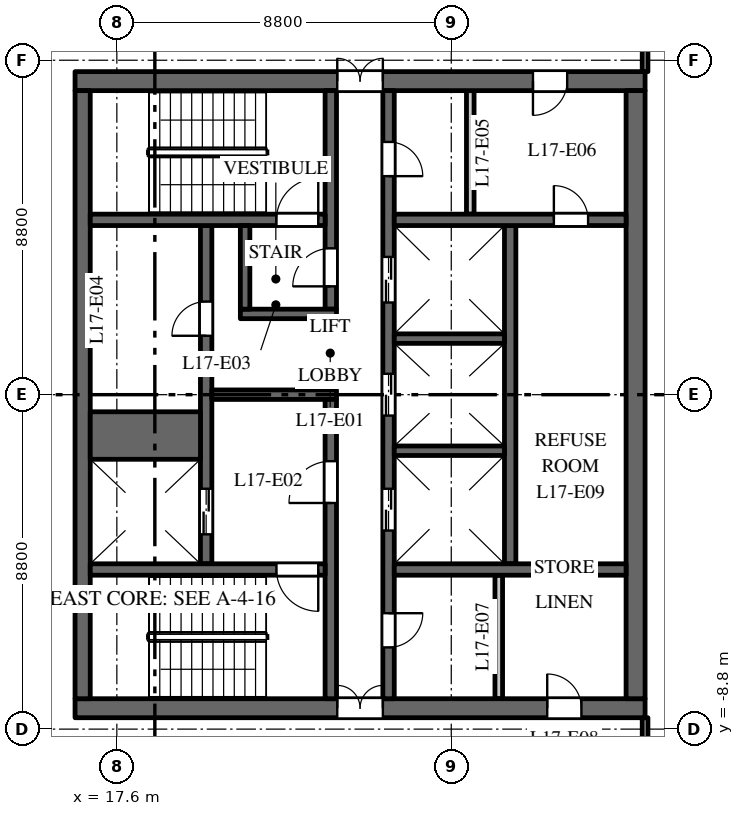
"""IFC4 building model, lengths in metres.
Left out: names, types, materials, properties, quantities, classifications, styles, units other than length and angle.
Written with IfcOpenShell. Run it as: python <this file> out.ifc"""

import sys

from ifc_helpers import new_model, si_unit, direction, frame, frame_2d, origin, place, context, subcontext, project, spatial, rectangle, extrude, element, fill, save


model = new_model("IFC4")
c1 = context("Model", 3, precision=1e-05, world=origin(), true_north=direction((0.0, 1.0)))
c2 = subcontext(c1, "Body", "Model", "MODEL_VIEW")
j1 = project(units=[si_unit("LENGTHUNIT", "METRE"), si_unit("PLANEANGLEUNIT", "RADIAN")], contexts=[c1])
p1 = place(None, origin())
s1 = spatial("IfcSite", under=j1, at=p1, CompositionType="ELEMENT")
p2 = place(p1, origin())
s2 = spatial("IfcBuilding", under=s1, at=p2, CompositionType="ELEMENT")
p3 = place(p2, frame((0.0, 0.0, 78.5)))
s3 = spatial("IfcBuildingStorey", under=s2, at=p3, CompositionType="ELEMENT", Elevation=78.5)
p4 = place(p3, frame((16.5, 8.25, 0.0), z_axis=(0.0, 0.0, 1.0), x_axis=(1.0, 0.0, 0.0)))
e1 = element("IfcWall", 1, at=p4, inside=s3, PredefinedType="SHEAR", context=c2, shape_type="SweptSolid", body=[
    extrude(rectangle(XDim=15.0, YDim=0.5, at=frame_2d((7.5, 0.0))), origin(), (0.0, 0.0, 1.0), 3.7),
])
p5 = place(p4, frame((6.9, 0.0, 0.0)))
e2 = element("IfcOpeningElement", 2, at=p5, cuts=e1, PredefinedType="OPENING", context=c2, shape_type="SweptSolid", body=[
    extrude(rectangle(XDim=1.2, YDim=2.1, at=frame_2d((0.6, 1.05))), frame((0.0, 0.26, 0.0), z_axis=(0.0, -1.0, 0.0), x_axis=(1.0, 0.0, 0.0)), (0.0, 0.0, 1.0), 0.52),
])
p6 = place(p4, frame((12.05, 0.0, 0.0)))
e3 = element("IfcOpeningElement", 3, at=p6, cuts=e1, PredefinedType="OPENING", context=c2, shape_type="SweptSolid", body=[
    extrude(rectangle(XDim=0.9, YDim=2.1, at=frame_2d((0.45, 1.05))), frame((0.0, 0.26, 0.0), z_axis=(0.0, -1.0, 0.0), x_axis=(1.0, 0.0, 0.0)), (0.0, 0.0, 1.0), 0.52),
])
p7 = place(p3, frame((16.5, -8.25, 0.0), z_axis=(0.0, 0.0, 1.0), x_axis=(1.0, 0.0, 0.0)))
e4 = element("IfcWall", 4, at=p7, inside=s3, PredefinedType="SHEAR", context=c2, shape_type="SweptSolid", body=[
    extrude(rectangle(XDim=15.0, YDim=0.5, at=frame_2d((7.5, 0.0))), origin(), (0.0, 0.0, 1.0), 3.7),
])
p8 = place(p7, frame((6.9, 0.0, 0.0)))
e5 = element("IfcOpeningElement", 5, at=p8, cuts=e4, PredefinedType="OPENING", context=c2, shape_type="SweptSolid", body=[
    extrude(rectangle(XDim=1.2, YDim=2.1, at=frame_2d((0.6, 1.05))), frame((0.0, 0.26, 0.0), z_axis=(0.0, -1.0, 0.0), x_axis=(1.0, 0.0, 0.0)), (0.0, 0.0, 1.0), 0.52),
])
p9 = place(p7, frame((12.425, 0.0, 0.0)))
e6 = element("IfcOpeningElement", 6, at=p9, cuts=e4, PredefinedType="OPENING", context=c2, shape_type="SweptSolid", body=[
    extrude(rectangle(XDim=0.9, YDim=2.1, at=frame_2d((0.45, 1.05))), frame((0.0, 0.26, 0.0), z_axis=(0.0, -1.0, 0.0), x_axis=(1.0, 0.0, 0.0)), (0.0, 0.0, 1.0), 0.52),
])
p10 = place(p3, frame((27.95, -4.45, 0.0), z_axis=(0.0, 0.0, 1.0), x_axis=(0.0, 1.0, 0.0)))
e7 = element("IfcWall", 7, at=p10, inside=s3, PredefinedType="SHEAR", context=c2, shape_type="SweptSolid", body=[
    extrude(rectangle(XDim=8.9, YDim=0.3, at=frame_2d((4.45, 0.0))), origin(), (0.0, 0.0, 1.0), 3.7),
])
p11 = place(p3, frame((19.95, -4.45, 0.0), z_axis=(0.0, 0.0, 1.0), x_axis=(0.0, 1.0, 0.0)))
e8 = element("IfcWall", 8, at=p11, inside=s3, PredefinedType="SHEAR", context=c2, shape_type="SweptSolid", body=[
    extrude(rectangle(XDim=8.9, YDim=0.3, at=frame_2d((4.45, 0.0))), origin(), (0.0, 0.0, 1.0), 3.7),
])
p12 = place(p11, frame((0.775, 0.0, 0.0)))
e9 = element("IfcOpeningElement", 9, at=p12, cuts=e8, PredefinedType="OPENING", context=c2, shape_type="SweptSolid", body=[
    extrude(rectangle(XDim=1.2, YDim=2.1, at=frame_2d((0.6, 1.05))), frame((0.0, 0.16, 0.0), z_axis=(0.0, -1.0, 0.0), x_axis=(1.0, 0.0, 0.0)), (0.0, 0.0, 1.0), 0.32),
])
p13 = place(p11, frame((6.0, 0.0, 0.0)))
e10 = element("IfcOpeningElement", 10, at=p13, cuts=e8, PredefinedType="OPENING", context=c2, shape_type="SweptSolid", body=[
    extrude(rectangle(XDim=0.9, YDim=2.1, at=frame_2d((0.45, 1.05))), frame((0.0, 0.16, 0.0), z_axis=(0.0, -1.0, 0.0), x_axis=(1.0, 0.0, 0.0)), (0.0, 0.0, 1.0), 0.32),
])
p14 = place(p3, frame((24.75, -8.0, 0.0), z_axis=(0.0, 0.0, 1.0), x_axis=(0.0, 1.0, 0.0)))
e11 = element("IfcWall", 11, at=p14, inside=s3, PredefinedType="SHEAR", context=c2, shape_type="SweptSolid", body=[
    extrude(rectangle(XDim=16.0, YDim=0.3, at=frame_2d((8.0, 0.0))), origin(), (0.0, 0.0, 1.0), 3.7),
])
p15 = place(p14, frame((4.425, 0.0, 0.0)))
e12 = element("IfcOpeningElement", 12, at=p15, cuts=e11, PredefinedType="OPENING", context=c2, shape_type="SweptSolid", body=[
    extrude(rectangle(XDim=1.1, YDim=2.1, at=frame_2d((0.55, 1.05))), frame((0.0, 0.16, 0.0), z_axis=(0.0, -1.0, 0.0), x_axis=(1.0, 0.0, 0.0)), (0.0, 0.0, 1.0), 0.32),
])
p16 = place(p14, frame((7.45, 0.0, 0.0)))
e13 = element("IfcOpeningElement", 13, at=p16, cuts=e11, PredefinedType="OPENING", context=c2, shape_type="SweptSolid", body=[
    extrude(rectangle(XDim=1.1, YDim=2.1, at=frame_2d((0.55, 1.05))), frame((0.0, 0.16, 0.0), z_axis=(0.0, -1.0, 0.0), x_axis=(1.0, 0.0, 0.0)), (0.0, 0.0, 1.0), 0.32),
])
p17 = place(p14, frame((10.425, 0.0, 0.0)))
e14 = element("IfcOpeningElement", 14, at=p17, cuts=e11, PredefinedType="OPENING", context=c2, shape_type="SweptSolid", body=[
    extrude(rectangle(XDim=1.2, YDim=2.1, at=frame_2d((0.6, 1.05))), frame((0.0, 0.16, 0.0), z_axis=(0.0, -1.0, 0.0), x_axis=(1.0, 0.0, 0.0)), (0.0, 0.0, 1.0), 0.32),
])
p18 = place(p14, frame((13.75, 0.0, 0.0)))
e15 = element("IfcOpeningElement", 15, at=p18, cuts=e11, PredefinedType="OPENING", context=c2, shape_type="SweptSolid", body=[
    extrude(rectangle(XDim=0.9, YDim=2.1, at=frame_2d((0.45, 1.05))), frame((0.0, 0.16, 0.0), z_axis=(0.0, -1.0, 0.0), x_axis=(1.0, 0.0, 0.0)), (0.0, 0.0, 1.0), 0.32),
])
p19 = place(p14, frame((1.35, 0.0, 0.0)))
e16 = element("IfcOpeningElement", 16, at=p19, cuts=e11, PredefinedType="OPENING", context=c2, shape_type="SweptSolid", body=[
    extrude(rectangle(XDim=0.9, YDim=2.1, at=frame_2d((0.45, 1.05))), frame((0.0, 0.16, 0.0), z_axis=(0.0, -1.0, 0.0), x_axis=(1.0, 0.0, 0.0)), (0.0, 0.0, 1.0), 0.32),
])
p20 = place(p3, frame((20.1, 0.0, 0.0), z_axis=(0.0, 0.0, 1.0), x_axis=(1.0, 0.0, 0.0)))
e17 = element("IfcWall", 17, at=p20, inside=s3, PredefinedType="SHEAR", context=c2, shape_type="SweptSolid", body=[
    extrude(rectangle(XDim=3.28, YDim=0.25, at=frame_2d((1.64, 0.0))), origin(), (0.0, 0.0, 1.0), 3.7),
])
p21 = place(p3, frame((16.7, -8.0, 0.0), z_axis=(0.0, 0.0, 1.0), x_axis=(0.0, 1.0, 0.0)))
e18 = element("IfcWall", 18, at=p21, inside=s3, PredefinedType="SHEAR", context=c2, shape_type="SweptSolid", body=[
    extrude(rectangle(XDim=16.0, YDim=0.4, at=frame_2d((8.0, 0.0))), origin(), (0.0, 0.0, 1.0), 3.7),
])
p22 = place(p3, frame((31.25, -8.0, 0.0), z_axis=(0.0, 0.0, 1.0), x_axis=(0.0, 1.0, 0.0)))
e19 = element("IfcWall", 19, at=p22, inside=s3, PredefinedType="SHEAR", context=c2, shape_type="SweptSolid", body=[
    extrude(rectangle(XDim=16.0, YDim=0.5, at=frame_2d((8.0, 0.0))), origin(), (0.0, 0.0, 1.0), 3.7),
])
p23 = place(p3, frame((24.9, 4.6, 0.0), z_axis=(0.0, 0.0, 1.0), x_axis=(1.0, 0.0, 0.0)))
e20 = element("IfcWall", 20, at=p23, inside=s3, PredefinedType="SHEAR", context=c2, shape_type="SweptSolid", body=[
    extrude(rectangle(XDim=6.1, YDim=0.3, at=frame_2d((3.05, 0.0))), origin(), (0.0, 0.0, 1.0), 3.7),
])
p24 = place(p23, frame((4.2, 0.0, 0.0)))
e21 = element("IfcOpeningElement", 21, at=p24, cuts=e20, PredefinedType="OPENING", context=c2, shape_type="SweptSolid", body=[
    extrude(rectangle(XDim=0.9, YDim=2.1, at=frame_2d((0.45, 1.05))), frame((0.0, 0.16, 0.0), z_axis=(0.0, -1.0, 0.0), x_axis=(1.0, 0.0, 0.0)), (0.0, 0.0, 1.0), 0.32),
])
for number, where, z_axis, x_axis in (
    (22, (26.9, 4.75, 0.0), (0.0, 0.0, 1.0), (0.0, 1.0, 0.0)),
    (23, (27.65, -8.0, 0.0), (0.0, 0.0, 1.0), (0.0, 1.0, 0.0)),
):
    element("IfcWall", number, at=place(p3, frame(where, z_axis=z_axis, x_axis=x_axis)), inside=s3, PredefinedType="PARTITIONING", context=c2, shape_type="SweptSolid", body=[
        extrude(rectangle(XDim=3.25, YDim=0.2, at=frame_2d((1.625, 0.0))), origin(), (0.0, 0.0, 1.0), 3.7),
    ])
p25 = place(p3, frame((24.9, -4.6, 0.0), z_axis=(0.0, 0.0, 1.0), x_axis=(1.0, 0.0, 0.0)))
e24 = element("IfcWall", 24, at=p25, inside=s3, PredefinedType="SHEAR", context=c2, shape_type="SweptSolid", body=[
    extrude(rectangle(XDim=6.1, YDim=0.3, at=frame_2d((3.05, 0.0))), origin(), (0.0, 0.0, 1.0), 3.7),
])
p26 = place(p3, frame((16.9, -1.075, 0.0), z_axis=(0.0, 0.0, 1.0), x_axis=(1.0, 0.0, 0.0)))
e25 = element("IfcWall", 25, at=p26, inside=s3, PredefinedType="SHEAR", context=c2, shape_type="SweptSolid", body=[
    extrude(rectangle(XDim=2.9, YDim=1.25, at=frame_2d((1.45, 0.0))), origin(), (0.0, 0.0, 1.0), 3.7),
])
for number, where, z_axis, x_axis in (
    (26, (24.9, -1.475, 0.0), (0.0, 0.0, 1.0), (1.0, 0.0, 0.0)),
    (27, (24.9, 1.475, 0.0), (0.0, 0.0, 1.0), (1.0, 0.0, 0.0)),
):
    element("IfcWall", number, at=place(p3, frame(where, z_axis=z_axis, x_axis=x_axis)), inside=s3, PredefinedType="SHEAR", context=c2, shape_type="SweptSolid", body=[
        extrude(rectangle(XDim=2.9, YDim=0.25, at=frame_2d((1.45, 0.0))), origin(), (0.0, 0.0, 1.0), 3.7),
    ])
p27 = place(p3, frame((23.23, 2.25, 0.0), z_axis=(0.0, 0.0, 1.0), x_axis=(0.0, 1.0, 0.0)))
e28 = element("IfcWall", 28, at=p27, inside=s3, PredefinedType="SHEAR", context=c2, shape_type="SweptSolid", body=[
    extrude(rectangle(XDim=5.75, YDim=0.3, at=frame_2d((2.875, 0.0))), origin(), (0.0, 0.0, 1.0), 3.7),
])
p28 = place(p27, frame((0.6, 0.0, 0.0)))
e29 = element("IfcOpeningElement", 29, at=p28, cuts=e28, PredefinedType="OPENING", context=c2, shape_type="SweptSolid", body=[
    extrude(rectangle(XDim=1.0, YDim=2.1, at=frame_2d((0.5, 1.05))), frame((0.0, 0.16, 0.0), z_axis=(0.0, -1.0, 0.0), x_axis=(1.0, 0.0, 0.0)), (0.0, 0.0, 1.0), 0.32),
])
p29 = place(p3, frame((23.23, -8.0, 0.0), z_axis=(0.0, 0.0, 1.0), x_axis=(0.0, 1.0, 0.0)))
e30 = element("IfcWall", 30, at=p29, inside=s3, PredefinedType="SHEAR", context=c2, shape_type="SweptSolid", body=[
    extrude(rectangle(XDim=7.875, YDim=0.3, at=frame_2d((3.938, 0.0))), origin(), (0.0, 0.0, 1.0), 3.7),
])
p30 = place(p29, frame((5.15, 0.0, 0.0)))
e31 = element("IfcOpeningElement", 31, at=p30, cuts=e30, PredefinedType="OPENING", context=c2, shape_type="SweptSolid", body=[
    extrude(rectangle(XDim=1.1, YDim=2.1, at=frame_2d((0.55, 1.05))), frame((0.0, 0.16, 0.0), z_axis=(0.0, -1.0, 0.0), x_axis=(1.0, 0.0, 0.0)), (0.0, 0.0, 1.0), 0.32),
])
p31 = place(p3, frame((16.9, 4.6, 0.0), z_axis=(0.0, 0.0, 1.0), x_axis=(1.0, 0.0, 0.0)))
e32 = element("IfcWall", 32, at=p31, inside=s3, PredefinedType="SHEAR", context=c2, shape_type="SweptSolid", body=[
    extrude(rectangle(XDim=6.18, YDim=0.3, at=frame_2d((3.09, 0.0))), origin(), (0.0, 0.0, 1.0), 3.7),
])
p32 = place(p31, frame((4.9, 0.0, 0.0)))
e33 = element("IfcOpeningElement", 33, at=p32, cuts=e32, PredefinedType="OPENING", context=c2, shape_type="SweptSolid", body=[
    extrude(rectangle(XDim=1.1, YDim=2.1, at=frame_2d((0.55, 1.05))), frame((0.0, 0.16, 0.0), z_axis=(0.0, -1.0, 0.0), x_axis=(1.0, 0.0, 0.0)), (0.0, 0.0, 1.0), 0.32),
])
p33 = place(p3, frame((16.9, -4.6, 0.0), z_axis=(0.0, 0.0, 1.0), x_axis=(1.0, 0.0, 0.0)))
e34 = element("IfcWall", 34, at=p33, inside=s3, PredefinedType="SHEAR", context=c2, shape_type="SweptSolid", body=[
    extrude(rectangle(XDim=6.18, YDim=0.3, at=frame_2d((3.09, 0.0))), origin(), (0.0, 0.0, 1.0), 3.7),
])
p34 = place(p33, frame((4.9, 0.0, 0.0)))
e35 = element("IfcOpeningElement", 35, at=p34, cuts=e34, PredefinedType="OPENING", context=c2, shape_type="SweptSolid", body=[
    extrude(rectangle(XDim=1.1, YDim=2.1, at=frame_2d((0.55, 1.05))), frame((0.0, 0.16, 0.0), z_axis=(0.0, -1.0, 0.0), x_axis=(1.0, 0.0, 0.0)), (0.0, 0.0, 1.0), 0.32),
])
p35 = place(p3, frame((20.85, 2.125, 0.0), z_axis=(0.0, 0.0, 1.0), x_axis=(1.0, 0.0, 0.0)))
e36 = element("IfcWall", 36, at=p35, inside=s3, PredefinedType="SHEAR", context=c2, shape_type="SweptSolid", body=[
    extrude(rectangle(XDim=2.53, YDim=0.25, at=frame_2d((1.265, 0.0))), origin(), (0.0, 0.0, 1.0), 3.7),
])
p36 = place(p3, frame((20.975, 2.25, 0.0), z_axis=(0.0, 0.0, 1.0), x_axis=(0.0, 1.0, 0.0)))
e37 = element("IfcWall", 37, at=p36, inside=s3, PredefinedType="SHEAR", context=c2, shape_type="SweptSolid", body=[
    extrude(rectangle(XDim=2.2, YDim=0.25, at=frame_2d((1.1, 0.0))), origin(), (0.0, 0.0, 1.0), 3.7),
])
p37 = place(p3, frame((31.5, -10.7, 0.0), z_axis=(0.0, 0.0, 1.0), x_axis=(0.0, 1.0, 0.0)))
e38 = element("IfcWall", 38, at=p37, inside=s3, PredefinedType="PARTITIONING", context=c2, shape_type="SweptSolid", body=[
    extrude(rectangle(XDim=2.2, YDim=0.15, at=frame_2d((1.1, 0.0))), origin(), (0.0, 0.0, 1.0), 2.85),
])
p38 = place(p37, frame((0.65, 0.0, 0.0)))
e39 = element("IfcOpeningElement", 39, at=p38, cuts=e38, PredefinedType="OPENING", context=c2, shape_type="SweptSolid", body=[
    extrude(rectangle(XDim=1.0, YDim=2.1, at=frame_2d((0.5, 1.05))), frame((0.0, 0.085, 0.0), z_axis=(0.0, -1.0, 0.0), x_axis=(1.0, 0.0, 0.0)), (0.0, 0.0, 1.0), 0.17),
])
p39 = place(p3, frame((31.5, 8.5, 0.0), z_axis=(0.0, 0.0, 1.0), x_axis=(0.0, 1.0, 0.0)))
e40 = element("IfcWall", 40, at=p39, inside=s3, PredefinedType="PARTITIONING", context=c2, shape_type="SweptSolid", body=[
    extrude(rectangle(XDim=2.2, YDim=0.15, at=frame_2d((1.1, 0.0))), origin(), (0.0, 0.0, 1.0), 2.85),
])
p40 = place(p12, origin())
e41 = element("IfcDoor", 41, at=p40, inside=s3, OperationType="DOUBLE_DOOR_SLIDING", PredefinedType="DOOR", context=c2, shape_type="SweptSolid", body=[
    extrude(rectangle(XDim=1.2, YDim=2.1, at=frame_2d((0.6, 1.05))), frame((0.0, 0.025, 0.0), z_axis=(0.0, -1.0, 0.0), x_axis=(1.0, 0.0, 0.0)), (0.0, 0.0, 1.0), 0.05),
])
fill(e9, e41)
p41 = place(p15, origin())
e42 = element("IfcDoor", 42, at=p41, inside=s3, OperationType="DOUBLE_DOOR_SLIDING", PredefinedType="DOOR", context=c2, shape_type="SweptSolid", body=[
    extrude(rectangle(XDim=1.1, YDim=2.1, at=frame_2d((0.55, 1.05))), frame((0.0, 0.025, 0.0), z_axis=(0.0, -1.0, 0.0), x_axis=(1.0, 0.0, 0.0)), (0.0, 0.0, 1.0), 0.05),
])
fill(e12, e42)
p42 = place(p16, origin())
e43 = element("IfcDoor", 43, at=p42, inside=s3, OperationType="DOUBLE_DOOR_SLIDING", PredefinedType="DOOR", context=c2, shape_type="SweptSolid", body=[
    extrude(rectangle(XDim=1.1, YDim=2.1, at=frame_2d((0.55, 1.05))), frame((0.0, 0.025, 0.0), z_axis=(0.0, -1.0, 0.0), x_axis=(1.0, 0.0, 0.0)), (0.0, 0.0, 1.0), 0.05),
])
fill(e13, e43)
p43 = place(p17, origin())
e44 = element("IfcDoor", 44, at=p43, inside=s3, OperationType="DOUBLE_DOOR_SLIDING", PredefinedType="DOOR", context=c2, shape_type="SweptSolid", body=[
    extrude(rectangle(XDim=1.2, YDim=2.1, at=frame_2d((0.6, 1.05))), frame((0.0, 0.025, 0.0), z_axis=(0.0, -1.0, 0.0), x_axis=(1.0, 0.0, 0.0)), (0.0, 0.0, 1.0), 0.05),
])
fill(e14, e44)
p44 = place(p32, origin())
e45 = element("IfcDoor", 45, at=p44, inside=s3, OperationType="SINGLE_SWING_LEFT", PredefinedType="DOOR", context=c2, shape_type="SweptSolid", body=[
    extrude(rectangle(XDim=1.1, YDim=2.1, at=frame_2d((0.55, 1.05))), frame((0.0, 0.025, 0.0), z_axis=(0.0, -1.0, 0.0), x_axis=(1.0, 0.0, 0.0)), (0.0, 0.0, 1.0), 0.05),
])
fill(e33, e45)
p45 = place(p34, origin())
e46 = element("IfcDoor", 46, at=p45, inside=s3, OperationType="SINGLE_SWING_RIGHT", PredefinedType="DOOR", context=c2, shape_type="SweptSolid", body=[
    extrude(rectangle(XDim=1.1, YDim=2.1, at=frame_2d((0.55, 1.05))), frame((0.0, 0.025, 0.0), z_axis=(0.0, -1.0, 0.0), x_axis=(1.0, 0.0, 0.0)), (0.0, 0.0, 1.0), 0.05),
])
fill(e35, e46)
p46 = place(p30, origin())
e47 = element("IfcDoor", 47, at=p46, inside=s3, OperationType="SINGLE_SWING_RIGHT", PredefinedType="DOOR", context=c2, shape_type="SweptSolid", body=[
    extrude(rectangle(XDim=1.1, YDim=2.1, at=frame_2d((0.55, 1.05))), frame((0.0, 0.025, 0.0), z_axis=(0.0, -1.0, 0.0), x_axis=(1.0, 0.0, 0.0)), (0.0, 0.0, 1.0), 0.05),
])
fill(e31, e47)
p47 = place(p28, origin())
e48 = element("IfcDoor", 48, at=p47, inside=s3, OperationType="SINGLE_SWING_RIGHT", PredefinedType="DOOR", context=c2, shape_type="SweptSolid", body=[
    extrude(rectangle(XDim=1.0, YDim=2.1, at=frame_2d((0.5, 1.05))), frame((0.0, 0.025, 0.0), z_axis=(0.0, -1.0, 0.0), x_axis=(1.0, 0.0, 0.0)), (0.0, 0.0, 1.0), 0.05),
])
fill(e29, e48)
p48 = place(p5, origin())
e49 = element("IfcDoor", 49, at=p48, inside=s3, OperationType="DOUBLE_DOOR_DOUBLE_SWING", PredefinedType="DOOR", context=c2, shape_type="SweptSolid", body=[
    extrude(rectangle(XDim=1.2, YDim=2.1, at=frame_2d((0.6, 1.05))), frame((0.0, 0.025, 0.0), z_axis=(0.0, -1.0, 0.0), x_axis=(1.0, 0.0, 0.0)), (0.0, 0.0, 1.0), 0.05),
])
fill(e2, e49)
p49 = place(p8, origin())
e50 = element("IfcDoor", 50, at=p49, inside=s3, OperationType="DOUBLE_DOOR_DOUBLE_SWING", PredefinedType="DOOR", context=c2, shape_type="SweptSolid", body=[
    extrude(rectangle(XDim=1.2, YDim=2.1, at=frame_2d((0.6, 1.05))), frame((0.0, 0.025, 0.0), z_axis=(0.0, -1.0, 0.0), x_axis=(1.0, 0.0, 0.0)), (0.0, 0.0, 1.0), 0.05),
])
fill(e5, e50)
p50 = place(p13, origin())
e51 = element("IfcDoor", 51, at=p50, inside=s3, OperationType="SINGLE_SWING_RIGHT", PredefinedType="DOOR", context=c2, shape_type="SweptSolid", body=[
    extrude(rectangle(XDim=0.9, YDim=2.1, at=frame_2d((0.45, 1.05))), frame((0.0, 0.025, 0.0), z_axis=(0.0, -1.0, 0.0), x_axis=(1.0, 0.0, 0.0)), (0.0, 0.0, 1.0), 0.05),
])
fill(e10, e51)
p51 = place(p18, origin())
e52 = element("IfcDoor", 52, at=p51, inside=s3, OperationType="SINGLE_SWING_LEFT", PredefinedType="DOOR", context=c2, shape_type="SweptSolid", body=[
    extrude(rectangle(XDim=0.9, YDim=2.1, at=frame_2d((0.45, 1.05))), frame((0.0, 0.025, 0.0), z_axis=(0.0, -1.0, 0.0), x_axis=(1.0, 0.0, 0.0)), (0.0, 0.0, 1.0), 0.05),
])
fill(e15, e52)
p52 = place(p6, origin())
e53 = element("IfcDoor", 53, at=p52, inside=s3, OperationType="SINGLE_SWING_LEFT", PredefinedType="DOOR", context=c2, shape_type="SweptSolid", body=[
    extrude(rectangle(XDim=0.9, YDim=2.1, at=frame_2d((0.45, 1.05))), frame((0.0, 0.025, 0.0), z_axis=(0.0, -1.0, 0.0), x_axis=(1.0, 0.0, 0.0)), (0.0, 0.0, 1.0), 0.05),
])
fill(e3, e53)
p53 = place(p19, origin())
e54 = element("IfcDoor", 54, at=p53, inside=s3, OperationType="SINGLE_SWING_RIGHT", PredefinedType="DOOR", context=c2, shape_type="SweptSolid", body=[
    extrude(rectangle(XDim=0.9, YDim=2.1, at=frame_2d((0.45, 1.05))), frame((0.0, 0.025, 0.0), z_axis=(0.0, -1.0, 0.0), x_axis=(1.0, 0.0, 0.0)), (0.0, 0.0, 1.0), 0.05),
])
fill(e16, e54)
p54 = place(p9, origin())
e55 = element("IfcDoor", 55, at=p54, inside=s3, OperationType="SINGLE_SWING_RIGHT", PredefinedType="DOOR", context=c2, shape_type="SweptSolid", body=[
    extrude(rectangle(XDim=0.9, YDim=2.1, at=frame_2d((0.45, 1.05))), frame((0.0, 0.025, 0.0), z_axis=(0.0, -1.0, 0.0), x_axis=(1.0, 0.0, 0.0)), (0.0, 0.0, 1.0), 0.05),
])
fill(e6, e55)
p55 = place(p24, origin())
e56 = element("IfcDoor", 56, at=p55, inside=s3, OperationType="SINGLE_SWING_RIGHT", PredefinedType="DOOR", context=c2, shape_type="SweptSolid", body=[
    extrude(rectangle(XDim=0.9, YDim=2.1, at=frame_2d((0.45, 1.05))), frame((0.0, 0.025, 0.0), z_axis=(0.0, -1.0, 0.0), x_axis=(1.0, 0.0, 0.0)), (0.0, 0.0, 1.0), 0.05),
])
fill(e21, e56)
save(model, sys.argv[1])
